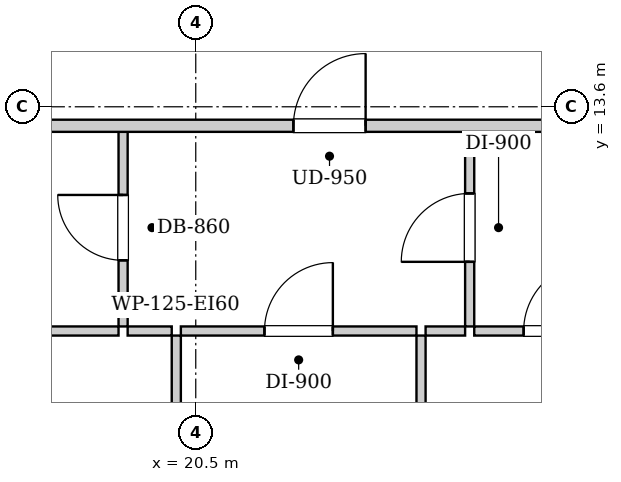
"""IFC4 building model, lengths in metres.
Left out: names, types, materials, properties, quantities, classifications, styles, units other than length and angle.
Written with IfcOpenShell. Run it as: python <this file> out.ifc"""

import sys

from ifc_helpers import new_model, si_unit, direction, frame, frame_2d, origin, place, context, subcontext, project, spatial, rectangle, extrude, element, fill, save


model = new_model("IFC4")
c1 = context("Model", 3, precision=1e-05, world=origin(), true_north=direction((0.0, 1.0)))
c2 = subcontext(c1, "Body", "Model", "MODEL_VIEW")
j1 = project(units=[si_unit("LENGTHUNIT", "METRE"), si_unit("PLANEANGLEUNIT", "RADIAN")], contexts=[c1])
p1 = place(None, origin())
s1 = spatial("IfcSite", under=j1, at=p1, CompositionType="ELEMENT")
p2 = place(p1, origin())
s2 = spatial("IfcBuilding", under=s1, at=p2, CompositionType="ELEMENT")
p3 = place(p2, frame((0.0, 0.0, 140.65)))
s3 = spatial("IfcBuildingStorey", under=s2, at=p3, CompositionType="ELEMENT", Elevation=140.65)
p4 = place(p3, frame((19.544, 10.71, 0.0), z_axis=(0.0, 0.0, 1.0), x_axis=(0.0, 1.0, 0.0)))
e1 = element("IfcWall", 1, at=p4, inside=s3, PredefinedType="PARTITIONING", context=c2, shape_type="SweptSolid", body=[
    extrude(rectangle(XDim=2.6, YDim=0.12, at=frame_2d((1.3, 0.0))), origin(), (0.0, 0.0, 1.0), 2.99),
])
p5 = place(p4, frame((0.87, 0.0, 0.0)))
e2 = element("IfcOpeningElement", 2, at=p5, cuts=e1, PredefinedType="OPENING", context=c2, shape_type="SweptSolid", body=[
    extrude(rectangle(XDim=0.86, YDim=2.05, at=frame_2d((0.43, 1.025))), frame((0.0, 0.07, 0.0), z_axis=(0.0, -1.0, 0.0), x_axis=(1.0, 0.0, 0.0)), (0.0, 0.0, 1.0), 0.14),
])
p6 = place(p3, frame((17.084, 10.65, 0.0), z_axis=(0.0, 0.0, 1.0), x_axis=(1.0, 0.0, 0.0)))
e3 = element("IfcWall", 3, at=p6, inside=s3, PredefinedType="PARTITIONING", context=c2, shape_type="SweptSolid", body=[
    extrude(rectangle(XDim=2.4, YDim=0.12, at=frame_2d((1.2, 0.0))), origin(), (0.0, 0.0, 1.0), 2.99),
])
p7 = place(p3, frame((24.104, 10.71, 0.0), z_axis=(0.0, 0.0, 1.0), x_axis=(0.0, 1.0, 0.0)))
e4 = element("IfcWall", 4, at=p7, inside=s3, PredefinedType="PARTITIONING", context=c2, shape_type="SweptSolid", body=[
    extrude(rectangle(XDim=2.6, YDim=0.12, at=frame_2d((1.3, 0.0))), origin(), (0.0, 0.0, 1.0), 2.99),
])
p8 = place(p7, frame((0.85, 0.0, 0.0)))
e5 = element("IfcOpeningElement", 5, at=p8, cuts=e4, PredefinedType="OPENING", context=c2, shape_type="SweptSolid", body=[
    extrude(rectangle(XDim=0.9, YDim=2.05, at=frame_2d((0.45, 1.025))), frame((0.0, 0.07, 0.0), z_axis=(0.0, -1.0, 0.0), x_axis=(1.0, 0.0, 0.0)), (0.0, 0.0, 1.0), 0.14),
])
p9 = place(p3, frame((19.604, 10.65, 0.0), z_axis=(0.0, 0.0, 1.0), x_axis=(1.0, 0.0, 0.0)))
e6 = element("IfcWall", 6, at=p9, inside=s3, PredefinedType="PARTITIONING", context=c2, shape_type="SweptSolid", body=[
    extrude(rectangle(XDim=0.58, YDim=0.12, at=frame_2d((0.29, 0.0))), origin(), (0.0, 0.0, 1.0), 2.99),
])
p10 = place(p3, frame((20.304, 10.65, 0.0), z_axis=(0.0, 0.0, 1.0), x_axis=(1.0, 0.0, 0.0)))
e7 = element("IfcWall", 7, at=p10, inside=s3, PredefinedType="PARTITIONING", context=c2, shape_type="SweptSolid", body=[
    extrude(rectangle(XDim=3.1, YDim=0.12, at=frame_2d((1.55, 0.0))), origin(), (0.0, 0.0, 1.0), 2.99),
])
p11 = place(p10, frame((1.1, 0.0, 0.0)))
e8 = element("IfcOpeningElement", 8, at=p11, cuts=e7, PredefinedType="OPENING", context=c2, shape_type="SweptSolid", body=[
    extrude(rectangle(XDim=0.9, YDim=2.05, at=frame_2d((0.45, 1.025))), frame((0.0, 0.07, 0.0), z_axis=(0.0, -1.0, 0.0), x_axis=(1.0, 0.0, 0.0)), (0.0, 0.0, 1.0), 0.14),
])
p12 = place(p3, frame((23.524, 10.65, 0.0), z_axis=(0.0, 0.0, 1.0), x_axis=(1.0, 0.0, 0.0)))
e9 = element("IfcWall", 9, at=p12, inside=s3, PredefinedType="PARTITIONING", context=c2, shape_type="SweptSolid", body=[
    extrude(rectangle(XDim=0.52, YDim=0.12, at=frame_2d((0.26, 0.0))), origin(), (0.0, 0.0, 1.0), 2.99),
])
p13 = place(p3, frame((24.164, 10.65, 0.0), z_axis=(0.0, 0.0, 1.0), x_axis=(1.0, 0.0, 0.0)))
e10 = element("IfcWall", 10, at=p13, inside=s3, PredefinedType="PARTITIONING", context=c2, shape_type="SweptSolid", body=[
    extrude(rectangle(XDim=2.2, YDim=0.12, at=frame_2d((1.1, 0.0))), origin(), (0.0, 0.0, 1.0), 2.99),
])
p14 = place(p13, frame((0.65, 0.0, 0.0)))
e11 = element("IfcOpeningElement", 11, at=p14, cuts=e10, PredefinedType="OPENING", context=c2, shape_type="SweptSolid", body=[
    extrude(rectangle(XDim=0.9, YDim=2.05, at=frame_2d((0.45, 1.025))), frame((0.0, 0.07, 0.0), z_axis=(0.0, -1.0, 0.0), x_axis=(1.0, 0.0, 0.0)), (0.0, 0.0, 1.0), 0.14),
])
p15 = place(p3, frame((20.244, 4.08, 0.0), z_axis=(0.0, 0.0, 1.0), x_axis=(0.0, 1.0, 0.0)))
e12 = element("IfcWall", 12, at=p15, inside=s3, PredefinedType="PARTITIONING", context=c2, shape_type="SweptSolid", body=[
    extrude(rectangle(XDim=6.51, YDim=0.12, at=frame_2d((3.255, 0.0))), origin(), (0.0, 0.0, 1.0), 2.99),
])
p16 = place(p15, frame((2.79, 0.0, 0.0)))
e13 = element("IfcOpeningElement", 13, at=p16, cuts=e12, PredefinedType="OPENING", context=c2, shape_type="SweptSolid", body=[
    extrude(rectangle(XDim=0.9, YDim=2.05, at=frame_2d((0.45, 1.025))), frame((0.0, 0.07, 0.0), z_axis=(0.0, -1.0, 0.0), x_axis=(1.0, 0.0, 0.0)), (0.0, 0.0, 1.0), 0.14),
])
p17 = place(p3, frame((23.464, 4.08, 0.0), z_axis=(0.0, 0.0, 1.0), x_axis=(0.0, 1.0, 0.0)))
e14 = element("IfcWall", 14, at=p17, inside=s3, PredefinedType="PARTITIONING", context=c2, shape_type="SweptSolid", body=[
    extrude(rectangle(XDim=6.51, YDim=0.12, at=frame_2d((3.255, 0.0))), origin(), (0.0, 0.0, 1.0), 2.99),
])
p18 = place(p17, frame((2.79, 0.0, 0.0)))
e15 = element("IfcOpeningElement", 15, at=p18, cuts=e14, PredefinedType="OPENING", context=c2, shape_type="SweptSolid", body=[
    extrude(rectangle(XDim=0.9, YDim=2.05, at=frame_2d((0.45, 1.025))), frame((0.0, 0.07, 0.0), z_axis=(0.0, -1.0, 0.0), x_axis=(1.0, 0.0, 0.0)), (0.0, 0.0, 1.0), 0.14),
])
p19 = place(p3, frame((10.05, 13.35, 0.0), z_axis=(0.0, 0.0, 1.0), x_axis=(1.0, 0.0, 0.0)))
e16 = element("IfcWall", 16, at=p19, inside=s3, PredefinedType="PARTITIONING", context=c2, shape_type="SweptSolid", body=[
    extrude(rectangle(XDim=27.7, YDim=0.16, at=frame_2d((13.85, 0.0))), origin(), (0.0, 0.0, 1.0), 2.99),
])
p20 = place(p19, frame((4.063, 0.0, 0.0)))
e17 = element("IfcOpeningElement", 17, at=p20, cuts=e16, PredefinedType="OPENING", context=c2, shape_type="SweptSolid", body=[
    extrude(rectangle(XDim=0.95, YDim=2.1, at=frame_2d((0.475, 1.05))), frame((0.0, 0.09, 0.0), z_axis=(0.0, -1.0, 0.0), x_axis=(1.0, 0.0, 0.0)), (0.0, 0.0, 1.0), 0.18),
])
p21 = place(p19, frame((11.735, 0.0, 0.0)))
e18 = element("IfcOpeningElement", 18, at=p21, cuts=e16, PredefinedType="OPENING", context=c2, shape_type="SweptSolid", body=[
    extrude(rectangle(XDim=0.95, YDim=2.1, at=frame_2d((0.475, 1.05))), frame((0.0, 0.09, 0.0), z_axis=(0.0, -1.0, 0.0), x_axis=(1.0, 0.0, 0.0)), (0.0, 0.0, 1.0), 0.18),
])
p22 = place(p5, origin())
e19 = element("IfcDoor", 19, at=p22, inside=s3, OperationType="SINGLE_SWING_RIGHT", PredefinedType="DOOR", context=c2, shape_type="SweptSolid", body=[
    extrude(rectangle(XDim=0.86, YDim=2.05, at=frame_2d((0.43, 1.025))), frame((0.0, 0.025, 0.0), z_axis=(0.0, -1.0, 0.0), x_axis=(1.0, 0.0, 0.0)), (0.0, 0.0, 1.0), 0.05),
])
fill(e2, e19)
p23 = place(p8, origin())
e20 = element("IfcDoor", 20, at=p23, inside=s3, OperationType="SINGLE_SWING_LEFT", PredefinedType="DOOR", context=c2, shape_type="SweptSolid", body=[
    extrude(rectangle(XDim=0.9, YDim=2.05, at=frame_2d((0.45, 1.025))), frame((0.0, 0.025, 0.0), z_axis=(0.0, -1.0, 0.0), x_axis=(1.0, 0.0, 0.0)), (0.0, 0.0, 1.0), 0.05),
])
fill(e5, e20)
p24 = place(p11, origin())
e21 = element("IfcDoor", 21, at=p24, inside=s3, OperationType="SINGLE_SWING_RIGHT", PredefinedType="DOOR", context=c2, shape_type="SweptSolid", body=[
    extrude(rectangle(XDim=0.9, YDim=2.05, at=frame_2d((0.45, 1.025))), frame((0.0, 0.025, 0.0), z_axis=(0.0, -1.0, 0.0), x_axis=(1.0, 0.0, 0.0)), (0.0, 0.0, 1.0), 0.05),
])
fill(e8, e21)
p25 = place(p14, origin())
e22 = element("IfcDoor", 22, at=p25, inside=s3, OperationType="SINGLE_SWING_RIGHT", PredefinedType="DOOR", context=c2, shape_type="SweptSolid", body=[
    extrude(rectangle(XDim=0.9, YDim=2.05, at=frame_2d((0.45, 1.025))), frame((0.0, 0.025, 0.0), z_axis=(0.0, -1.0, 0.0), x_axis=(1.0, 0.0, 0.0)), (0.0, 0.0, 1.0), 0.05),
])
fill(e11, e22)
p26 = place(p21, origin())
e23 = element("IfcDoor", 23, at=p26, inside=s3, OperationType="SINGLE_SWING_RIGHT", PredefinedType="DOOR", context=c2, shape_type="SweptSolid", body=[
    extrude(rectangle(XDim=0.95, YDim=2.1, at=frame_2d((0.475, 1.05))), frame((0.0, 0.025, 0.0), z_axis=(0.0, -1.0, 0.0), x_axis=(1.0, 0.0, 0.0)), (0.0, 0.0, 1.0), 0.05),
])
fill(e18, e23)
save(model, sys.argv[1])
